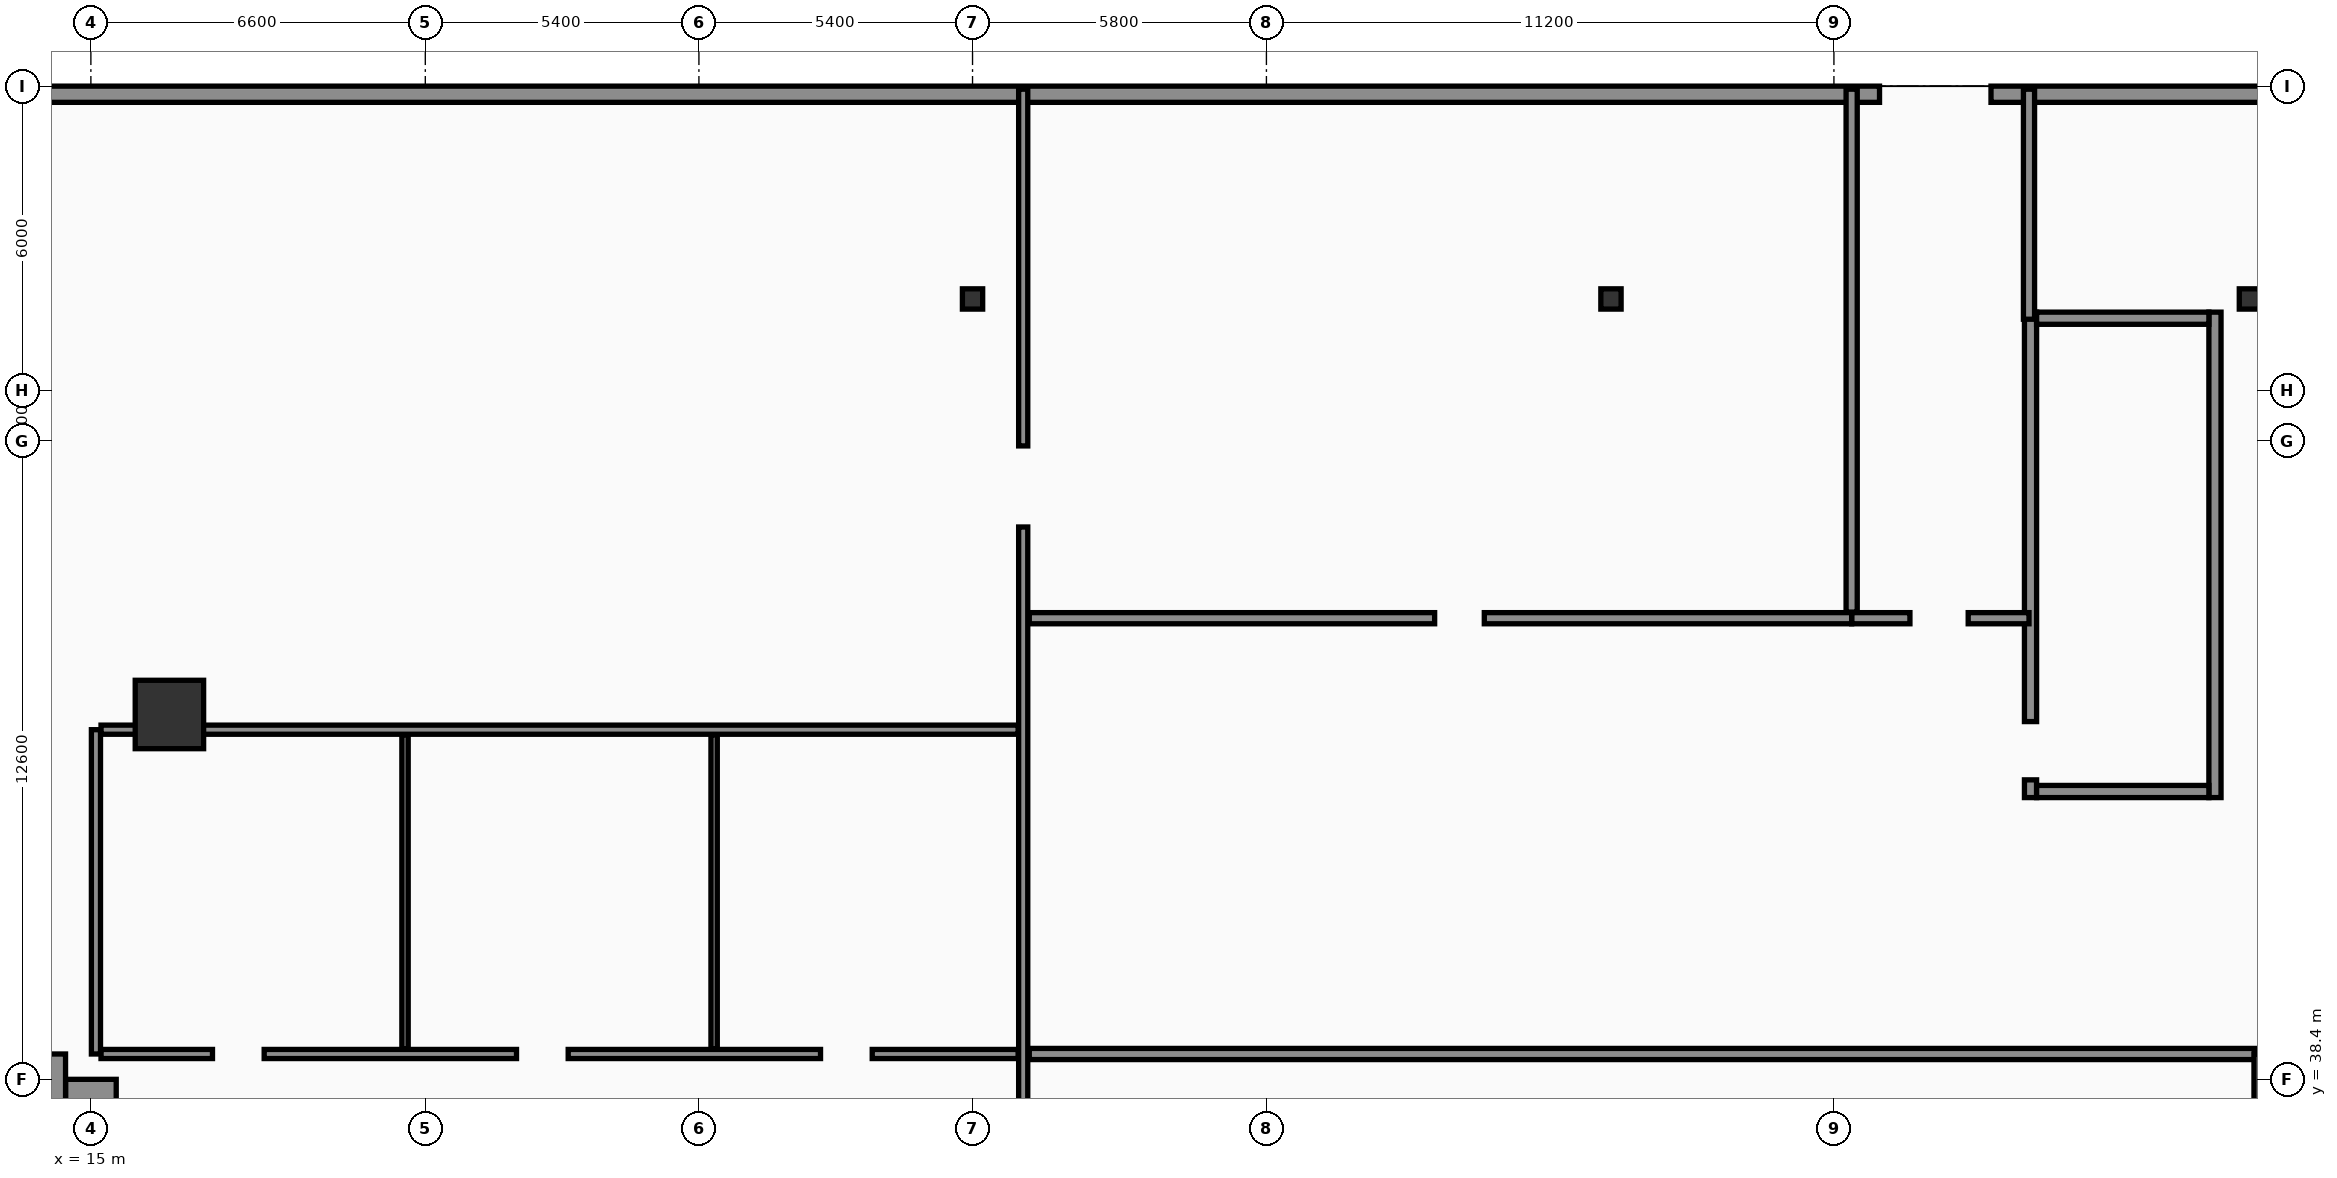
"""IFC4 building model, lengths in metres.
Left out: names, types, materials, properties, quantities, classifications, styles, units other than length and angle.
Written with IfcOpenShell. Run it as: python <this file> out.ifc"""

import sys

from ifc_helpers import new_model, si_unit, direction, frame, frame_2d, origin, origin_2d, place, context, subcontext, project, spatial, rectangle, i_section, extrude, element, fill, save


model = new_model("IFC4")
c1 = context("Model", 3, precision=1e-05, world=origin(), true_north=direction((0.0, 1.0)))
c2 = subcontext(c1, "Body", "Model", "MODEL_VIEW")
j1 = project(units=[si_unit("LENGTHUNIT", "METRE"), si_unit("PLANEANGLEUNIT", "RADIAN")], contexts=[c1])
p1 = place(None, origin())
s1 = spatial("IfcSite", under=j1, at=p1, CompositionType="ELEMENT")
p2 = place(p1, origin())
s2 = spatial("IfcBuilding", under=s1, at=p2, CompositionType="ELEMENT")
p3 = place(p2, origin())
s3 = spatial("IfcBuildingStorey", under=s2, at=p3, CompositionType="ELEMENT", Elevation=0.0)
p4 = place(p3, frame((15.0, 16.8, 0.0), z_axis=(0.0, 0.0, 1.0), x_axis=(0.0, 1.0, 0.0)))
e1 = element("IfcWall", 1, at=p4, inside=s3, PredefinedType="SHEAR", context=c2, shape_type="SweptSolid", body=[
    extrude(rectangle(XDim=21.6, YDim=1.0, at=frame_2d((10.8, 0.0))), origin(), (0.0, 0.0, 1.0), 5.68),
])
p5 = place(p4, frame((8.65, 0.0, 0.0)))
e2 = element("IfcOpeningElement", 2, at=p5, cuts=e1, PredefinedType="OPENING", context=c2, shape_type="SweptSolid", body=[
    extrude(rectangle(XDim=1.1, YDim=2.2, at=frame_2d((0.55, 1.1))), frame((0.0, 0.51, 0.0), z_axis=(0.0, -1.0, 0.0), x_axis=(1.0, 0.0, 0.0)), (0.0, 0.0, 1.0), 1.02),
])
p6 = place(p4, frame((1.25, 0.0, 0.0)))
e3 = element("IfcOpeningElement", 3, at=p6, cuts=e1, PredefinedType="OPENING", context=c2, shape_type="SweptSolid", body=[
    extrude(rectangle(XDim=1.1, YDim=2.2, at=frame_2d((0.55, 1.1))), frame((0.0, 0.51, 0.0), z_axis=(0.0, -1.0, 0.0), x_axis=(1.0, 0.0, 0.0)), (0.0, 0.0, 1.0), 1.02),
])
p7 = place(p4, frame((3.8, 0.0, 0.0)))
e4 = element("IfcOpeningElement", 4, at=p7, cuts=e1, PredefinedType="OPENING", context=c2, shape_type="SweptSolid", body=[
    extrude(rectangle(XDim=1.1, YDim=2.2, at=frame_2d((0.55, 1.1))), frame((0.0, 0.51, 0.0), z_axis=(0.0, -1.0, 0.0), x_axis=(1.0, 0.0, 0.0)), (0.0, 0.0, 1.0), 1.02),
])
p8 = place(p4, frame((6.35, 0.0, 0.0)))
e5 = element("IfcOpeningElement", 5, at=p8, cuts=e1, PredefinedType="OPENING", context=c2, shape_type="SweptSolid", body=[
    extrude(rectangle(XDim=1.1, YDim=2.2, at=frame_2d((0.55, 1.1))), frame((0.0, 0.51, 0.0), z_axis=(0.0, -1.0, 0.0), x_axis=(1.0, 0.0, 0.0)), (0.0, 0.0, 1.0), 1.02),
])
p9 = place(p4, frame((10.85, 0.0, 0.0)))
e6 = element("IfcOpeningElement", 6, at=p9, cuts=e1, PredefinedType="OPENING", context=c2, shape_type="SweptSolid", body=[
    extrude(rectangle(XDim=1.1, YDim=2.2, at=frame_2d((0.55, 1.1))), frame((0.0, 0.51, 0.0), z_axis=(0.0, -1.0, 0.0), x_axis=(1.0, 0.0, 0.0)), (0.0, 0.0, 1.0), 1.02),
])
p10 = place(p4, frame((13.5, 0.0, 0.0)))
e7 = element("IfcOpeningElement", 7, at=p10, cuts=e1, PredefinedType="OPENING", context=c2, shape_type="SweptSolid", body=[
    extrude(rectangle(XDim=1.1, YDim=2.2, at=frame_2d((0.55, 1.1))), frame((0.0, 0.51, 0.0), z_axis=(0.0, -1.0, 0.0), x_axis=(1.0, 0.0, 0.0)), (0.0, 0.0, 1.0), 1.02),
])
p11 = place(p4, frame((16.15, 0.0, 0.0)))
e8 = element("IfcOpeningElement", 8, at=p11, cuts=e1, PredefinedType="OPENING", context=c2, shape_type="SweptSolid", body=[
    extrude(rectangle(XDim=1.1, YDim=2.2, at=frame_2d((0.55, 1.1))), frame((0.0, 0.51, 0.0), z_axis=(0.0, -1.0, 0.0), x_axis=(1.0, 0.0, 0.0)), (0.0, 0.0, 1.0), 1.02),
])
p12 = place(p4, frame((18.9, 0.0, 0.0)))
e9 = element("IfcOpeningElement", 9, at=p12, cuts=e1, PredefinedType="OPENING", context=c2, shape_type="SweptSolid", body=[
    extrude(rectangle(XDim=1.1, YDim=2.2, at=frame_2d((0.55, 1.1))), frame((0.0, 0.51, 0.0), z_axis=(0.0, -1.0, 0.0), x_axis=(1.0, 0.0, 0.0)), (0.0, 0.0, 1.0), 1.02),
])
p13 = place(p3, frame((4.7, 38.4, 0.0), z_axis=(0.0, 0.0, 1.0), x_axis=(1.0, 0.0, 0.0)))
e10 = element("IfcWall", 10, at=p13, inside=s3, PredefinedType="SHEAR", context=c2, shape_type="SweptSolid", body=[
    extrude(rectangle(XDim=9.8, YDim=1.0, at=frame_2d((4.9, 0.0))), origin(), (0.0, 0.0, 1.0), 5.68),
])
p14 = place(p13, frame((5.6, 0.0, 0.0)))
e11 = element("IfcOpeningElement", 11, at=p14, cuts=e10, PredefinedType="OPENING", context=c2, shape_type="SweptSolid", body=[
    extrude(rectangle(XDim=1.1, YDim=2.2, at=frame_2d((0.55, 1.1))), frame((0.0, 0.51, 0.0), z_axis=(0.0, -1.0, 0.0), x_axis=(1.0, 0.0, 0.0)), (0.0, 0.0, 1.0), 1.02),
])
p15 = place(p3, frame((53.28, 43.96, 0.0), z_axis=(0.0, 0.0, 1.0), x_axis=(0.0, 1.0, 0.0)))
e12 = element("IfcWall", 12, at=p15, inside=s3, PredefinedType="SOLIDWALL", context=c2, shape_type="SweptSolid", body=[
    extrude(rectangle(XDim=9.58, YDim=0.24, at=frame_2d((4.79, 0.0))), origin(), (0.0, 0.0, 1.0), 5.68),
])
p16 = place(p15, frame((0.35, 0.0, 0.0)))
e13 = element("IfcOpeningElement", 13, at=p16, cuts=e12, PredefinedType="OPENING", context=c2, shape_type="SweptSolid", body=[
    extrude(rectangle(XDim=1.15, YDim=2.2, at=frame_2d((0.575, 1.1))), frame((0.0, 0.13, 0.0), z_axis=(0.0, -1.0, 0.0), x_axis=(1.0, 0.0, 0.0)), (0.0, 0.0, 1.0), 0.26),
])
p17 = place(p3, frame((56.92, 43.96, 0.0), z_axis=(0.0, 0.0, 1.0), x_axis=(0.0, 1.0, 0.0)))
e14 = element("IfcWall", 14, at=p17, inside=s3, PredefinedType="SOLIDWALL", context=c2, shape_type="SweptSolid", body=[
    extrude(rectangle(XDim=9.58, YDim=0.24, at=frame_2d((4.79, 0.0))), origin(), (0.0, 0.0, 1.0), 5.68),
])
for number, where, z_axis, x_axis in (
    (15, (53.4, 44.08, 0.0), (0.0, 0.0, 1.0), (1.0, 0.0, 0.0)),
    (16, (53.4, 53.42, 0.0), (0.0, 0.0, 1.0), (1.0, 0.0, 0.0)),
):
    element("IfcWall", number, at=place(p3, frame(where, z_axis=z_axis, x_axis=x_axis)), inside=s3, PredefinedType="SOLIDWALL", context=c2, shape_type="SweptSolid", body=[
        extrude(rectangle(XDim=3.4, YDim=0.24, at=frame_2d((1.7, 0.0))), origin(), (0.0, 0.0, 1.0), 5.68),
    ])
p18 = place(p3, frame((16.55, 45.6, 0.0), z_axis=(0.0, 0.0, 1.0), x_axis=(1.0, 0.0, 0.0)))
e17 = element("IfcColumn", 17, at=p18, inside=s3, PredefinedType="COLUMN", context=c2, shape_type="SweptSolid", body=[
    extrude(rectangle(XDim=1.35, YDim=1.35, at=origin_2d()), origin(), (0.0, 0.0, 1.0), 5.68),
])
for number, where, z_axis, x_axis in (
    (18, (32.4, 53.8, 0.0), (0.0, 0.0, 1.0), (1.0, 0.0, 0.0)),
    (19, (45.0, 53.8, 0.0), (0.0, 0.0, 1.0), (1.0, 0.0, 0.0)),
    (20, (57.6, 53.8, 0.0), (0.0, 0.0, 1.0), (1.0, 0.0, 0.0)),
):
    element("IfcColumn", number, at=place(p3, frame(where, z_axis=z_axis, x_axis=x_axis)), inside=s3, PredefinedType="PILASTER", context=c2, shape_type="SweptSolid", body=[
        extrude(i_section(OverallWidth=0.4, OverallDepth=0.4, WebThickness=0.013, FlangeThickness=0.021, FilletRadius=0.022, at=origin_2d()), origin(), (0.0, 0.0, 1.0), 5.68),
    ])
p19 = place(p3, frame((2.3, 57.84, 0.0), z_axis=(0.0, 0.0, 1.0), x_axis=(1.0, 0.0, 0.0)))
e21 = element("IfcWall", 21, at=p19, inside=s3, PredefinedType="SOLIDWALL", context=c2, shape_type="SweptSolid", body=[
    extrude(rectangle(XDim=79.4, YDim=0.32, at=frame_2d((39.7, 0.0))), origin(), (0.0, 0.0, 1.0), 5.68),
])
p20 = place(p19, frame((48.0, 0.0, 0.0)))
e22 = element("IfcOpeningElement", 22, at=p20, cuts=e21, PredefinedType="OPENING", context=c2, shape_type="SweptSolid", body=[
    extrude(rectangle(XDim=2.2, YDim=2.5, at=frame_2d((1.1, 1.25))), frame((0.0, 0.17, 0.0), z_axis=(0.0, -1.0, 0.0), x_axis=(1.0, 0.0, 0.0)), (0.0, 0.0, 1.0), 0.34),
])
p21 = place(p19, frame((57.0, 0.0, 0.0)))
e23 = element("IfcOpeningElement", 23, at=p21, cuts=e21, PredefinedType="OPENING", context=c2, shape_type="SweptSolid", body=[
    extrude(rectangle(XDim=4.2, YDim=2.8, at=frame_2d((2.1, 1.4))), frame((0.0, 0.17, 0.0), z_axis=(0.0, -1.0, 0.0), x_axis=(1.0, 0.0, 0.0)), (0.0, 0.0, 1.0), 0.34),
])
p22 = place(p19, frame((67.2, 0.0, 0.0)))
e24 = element("IfcOpeningElement", 24, at=p22, cuts=e21, PredefinedType="OPENING", context=c2, shape_type="SweptSolid", body=[
    extrude(rectangle(XDim=3.6, YDim=4.2, at=frame_2d((1.8, 2.1))), frame((0.0, 0.17, 0.0), z_axis=(0.0, -1.0, 0.0), x_axis=(1.0, 0.0, 0.0)), (0.0, 0.0, 1.0), 0.34),
])
p23 = place(p3, frame((49.75, 47.5, 0.0), z_axis=(0.0, 0.0, 1.0), x_axis=(1.0, 0.0, 0.0)))
e25 = element("IfcWall", 25, at=p23, inside=s3, PredefinedType="SOLIDWALL", context=c2, shape_type="SweptSolid", body=[
    extrude(rectangle(XDim=3.5, YDim=0.22, at=frame_2d((1.75, 0.0))), origin(), (0.0, 0.0, 1.0), 5.68),
])
p24 = place(p23, frame((1.15, 0.0, 0.0)))
e26 = element("IfcOpeningElement", 26, at=p24, cuts=e25, PredefinedType="OPENING", context=c2, shape_type="SweptSolid", body=[
    extrude(rectangle(XDim=1.15, YDim=2.2, at=frame_2d((0.575, 1.1))), frame((0.0, 0.12, 0.0), z_axis=(0.0, -1.0, 0.0), x_axis=(1.0, 0.0, 0.0)), (0.0, 0.0, 1.0), 0.24),
])
p25 = place(p3, frame((49.75, 47.62, 0.0), z_axis=(0.0, 0.0, 1.0), x_axis=(0.0, 1.0, 0.0)))
e27 = element("IfcWall", 27, at=p25, inside=s3, PredefinedType="SOLIDWALL", context=c2, shape_type="SweptSolid", body=[
    extrude(rectangle(XDim=10.32, YDim=0.22, at=frame_2d((5.16, 0.0))), origin(), (0.0, 0.0, 1.0), 4.88),
])
p26 = place(p3, frame((53.25, 53.4, 0.0), z_axis=(0.0, 0.0, 1.0), x_axis=(0.0, 1.0, 0.0)))
e28 = element("IfcWall", 28, at=p26, inside=s3, PredefinedType="SOLIDWALL", context=c2, shape_type="SweptSolid", body=[
    extrude(rectangle(XDim=4.54, YDim=0.22, at=frame_2d((2.27, 0.0))), origin(), (0.0, 0.0, 1.0), 4.88),
])
p27 = place(p3, frame((15.2, 38.9, 0.0), z_axis=(0.0, 0.0, 1.0), x_axis=(1.0, 0.0, 0.0)))
e29 = element("IfcWall", 29, at=p27, inside=s3, PredefinedType="PARTITIONING", context=c2, shape_type="SweptSolid", body=[
    extrude(rectangle(XDim=18.1, YDim=0.18, at=frame_2d((9.05, 0.0))), origin(), (0.0, 0.0, 1.0), 4.88),
])
p28 = place(p27, frame((2.2, 0.0, 0.0)))
e30 = element("IfcOpeningElement", 30, at=p28, cuts=e29, PredefinedType="OPENING", context=c2, shape_type="SweptSolid", body=[
    extrude(rectangle(XDim=1.02, YDim=2.2, at=frame_2d((0.51, 1.1))), frame((0.0, 0.1, 0.0), z_axis=(0.0, -1.0, 0.0), x_axis=(1.0, 0.0, 0.0)), (0.0, 0.0, 1.0), 0.2),
])
p29 = place(p27, frame((8.2, 0.0, 0.0)))
e31 = element("IfcOpeningElement", 31, at=p29, cuts=e29, PredefinedType="OPENING", context=c2, shape_type="SweptSolid", body=[
    extrude(rectangle(XDim=1.02, YDim=2.2, at=frame_2d((0.51, 1.1))), frame((0.0, 0.1, 0.0), z_axis=(0.0, -1.0, 0.0), x_axis=(1.0, 0.0, 0.0)), (0.0, 0.0, 1.0), 0.2),
])
p30 = place(p27, frame((14.2, 0.0, 0.0)))
e32 = element("IfcOpeningElement", 32, at=p30, cuts=e29, PredefinedType="OPENING", context=c2, shape_type="SweptSolid", body=[
    extrude(rectangle(XDim=1.02, YDim=2.2, at=frame_2d((0.51, 1.1))), frame((0.0, 0.1, 0.0), z_axis=(0.0, -1.0, 0.0), x_axis=(1.0, 0.0, 0.0)), (0.0, 0.0, 1.0), 0.2),
])
p31 = place(p3, frame((15.2, 45.3, 0.0), z_axis=(0.0, 0.0, 1.0), x_axis=(1.0, 0.0, 0.0)))
e33 = element("IfcWall", 33, at=p31, inside=s3, PredefinedType="PARTITIONING", context=c2, shape_type="SweptSolid", body=[
    extrude(rectangle(XDim=18.1, YDim=0.18, at=frame_2d((9.05, 0.0))), origin(), (0.0, 0.0, 1.0), 4.88),
])
p32 = place(p3, frame((15.1, 38.9, 0.0), z_axis=(0.0, 0.0, 1.0), x_axis=(0.0, 1.0, 0.0)))
e34 = element("IfcWall", 34, at=p32, inside=s3, PredefinedType="PARTITIONING", context=c2, shape_type="SweptSolid", body=[
    extrude(rectangle(XDim=6.4, YDim=0.18, at=frame_2d((3.2, 0.0))), origin(), (0.0, 0.0, 1.0), 4.88),
])
p33 = place(p3, frame((21.2, 39.0, 0.0), z_axis=(0.0, 0.0, 1.0), x_axis=(0.0, 1.0, 0.0)))
e35 = element("IfcWall", 35, at=p33, inside=s3, PredefinedType="PARTITIONING", context=c2, shape_type="SweptSolid", body=[
    extrude(rectangle(XDim=6.2, YDim=0.125, at=frame_2d((3.1, 0.0))), origin(), (0.0, 0.0, 1.0), 4.88),
])
p34 = place(p3, frame((27.3, 39.0, 0.0), z_axis=(0.0, 0.0, 1.0), x_axis=(0.0, 1.0, 0.0)))
e36 = element("IfcWall", 36, at=p34, inside=s3, PredefinedType="PARTITIONING", context=c2, shape_type="SweptSolid", body=[
    extrude(rectangle(XDim=6.2, YDim=0.125, at=frame_2d((3.1, 0.0))), origin(), (0.0, 0.0, 1.0), 5.68),
])
p35 = place(p3, frame((33.4, 0.3, 0.0), z_axis=(0.0, 0.0, 1.0), x_axis=(0.0, 1.0, 0.0)))
e37 = element("IfcWall", 37, at=p35, inside=s3, PredefinedType="PARTITIONING", context=c2, shape_type="SweptSolid", body=[
    extrude(rectangle(XDim=57.64, YDim=0.18, at=frame_2d((28.82, 0.0))), origin(), (0.0, 0.0, 1.0), 4.88),
])
p36 = place(p35, frame((6.0, 0.0, 0.0)))
e38 = element("IfcOpeningElement", 38, at=p36, cuts=e37, PredefinedType="OPENING", context=c2, shape_type="SweptSolid", body=[
    extrude(rectangle(XDim=1.5, YDim=2.22, at=frame_2d((0.75, 1.11))), frame((0.0, 0.1, 0.0), z_axis=(0.0, -1.0, 0.0), x_axis=(1.0, 0.0, 0.0)), (0.0, 0.0, 1.0), 0.2),
])
p37 = place(p35, frame((20.0, 0.0, 0.0)))
e39 = element("IfcOpeningElement", 39, at=p37, cuts=e37, PredefinedType="OPENING", context=c2, shape_type="SweptSolid", body=[
    extrude(rectangle(XDim=1.8, YDim=2.4, at=frame_2d((0.9, 1.2))), frame((0.0, 0.1, 0.0), z_axis=(0.0, -1.0, 0.0), x_axis=(1.0, 0.0, 0.0)), (0.0, 0.0, 1.0), 0.2),
])
p38 = place(p35, frame((49.0, 0.0, 0.0)))
e40 = element("IfcOpeningElement", 40, at=p38, cuts=e37, PredefinedType="OPENING", context=c2, shape_type="SweptSolid", body=[
    extrude(rectangle(XDim=1.6, YDim=2.35, at=frame_2d((0.8, 1.175))), frame((0.0, 0.1, 0.0), z_axis=(0.0, -1.0, 0.0), x_axis=(1.0, 0.0, 0.0)), (0.0, 0.0, 1.0), 0.2),
])
p39 = place(p3, frame((33.52, 38.9, 0.0), z_axis=(0.0, 0.0, 1.0), x_axis=(1.0, 0.0, 0.0)))
e41 = element("IfcWall", 41, at=p39, inside=s3, PredefinedType="SOLIDWALL", context=c2, shape_type="SweptSolid", body=[
    extrude(rectangle(XDim=24.18, YDim=0.22, at=frame_2d((12.09, 0.0))), origin(), (0.0, 0.0, 1.0), 4.88),
])
p40 = place(p3, frame((57.8, 0.06, 0.0), z_axis=(0.0, 0.0, 1.0), x_axis=(0.0, 1.0, 0.0)))
e42 = element("IfcWall", 42, at=p40, inside=s3, PredefinedType="SOLIDWALL", context=c2, shape_type="SweptSolid", body=[
    extrude(rectangle(XDim=38.84, YDim=0.22, at=frame_2d((19.42, 0.0))), origin(), (0.0, 0.0, 1.0), 4.18),
])
p41 = place(p3, frame((33.52, 47.5, 0.0), z_axis=(0.0, 0.0, 1.0), x_axis=(1.0, 0.0, 0.0)))
e43 = element("IfcWall", 43, at=p41, inside=s3, PredefinedType="SOLIDWALL", context=c2, shape_type="SweptSolid", body=[
    extrude(rectangle(XDim=16.23, YDim=0.22, at=frame_2d((8.115, 0.0))), origin(), (0.0, 0.0, 1.0), 4.88),
])
p42 = place(p41, frame((8.0, 0.0, 0.0)))
e44 = element("IfcOpeningElement", 44, at=p42, cuts=e43, PredefinedType="OPENING", context=c2, shape_type="SweptSolid", body=[
    extrude(rectangle(XDim=0.98, YDim=2.15, at=frame_2d((0.49, 1.075))), frame((0.0, 0.12, 0.0), z_axis=(0.0, -1.0, 0.0), x_axis=(1.0, 0.0, 0.0)), (0.0, 0.0, 1.0), 0.24),
])
p43 = place(p20, origin())
e45 = element("IfcDoor", 45, at=p43, inside=s3, OperationType="DOUBLE_DOOR_SINGLE_SWING", PredefinedType="DOOR", context=c2, shape_type="SweptSolid", body=[
    extrude(rectangle(XDim=2.2, YDim=2.5, at=frame_2d((1.1, 1.25))), frame((0.0, 0.025, 0.0), z_axis=(0.0, -1.0, 0.0), x_axis=(1.0, 0.0, 0.0)), (0.0, 0.0, 1.0), 0.05),
])
fill(e22, e45)
p44 = place(p24, origin())
e46 = element("IfcDoor", 46, at=p44, inside=s3, OperationType="SINGLE_SWING_LEFT", PredefinedType="DOOR", context=c2, shape_type="SweptSolid", body=[
    extrude(rectangle(XDim=1.15, YDim=2.2, at=frame_2d((0.575, 1.1))), frame((0.0, 0.025, 0.0), z_axis=(0.0, -1.0, 0.0), x_axis=(1.0, 0.0, 0.0)), (0.0, 0.0, 1.0), 0.05),
])
fill(e26, e46)
p45 = place(p28, origin())
e47 = element("IfcDoor", 47, at=p45, inside=s3, OperationType="SINGLE_SWING_LEFT", PredefinedType="DOOR", context=c2, shape_type="SweptSolid", body=[
    extrude(rectangle(XDim=1.02, YDim=2.2, at=frame_2d((0.51, 1.1))), frame((0.0, 0.025, 0.0), z_axis=(0.0, -1.0, 0.0), x_axis=(1.0, 0.0, 0.0)), (0.0, 0.0, 1.0), 0.05),
])
fill(e30, e47)
p46 = place(p29, origin())
e48 = element("IfcDoor", 48, at=p46, inside=s3, OperationType="SINGLE_SWING_RIGHT", PredefinedType="DOOR", context=c2, shape_type="SweptSolid", body=[
    extrude(rectangle(XDim=1.02, YDim=2.2, at=frame_2d((0.51, 1.1))), frame((0.0, 0.025, 0.0), z_axis=(0.0, -1.0, 0.0), x_axis=(1.0, 0.0, 0.0)), (0.0, 0.0, 1.0), 0.05),
])
fill(e31, e48)
p47 = place(p30, origin())
e49 = element("IfcDoor", 49, at=p47, inside=s3, OperationType="SINGLE_SWING_LEFT", PredefinedType="DOOR", context=c2, shape_type="SweptSolid", body=[
    extrude(rectangle(XDim=1.02, YDim=2.2, at=frame_2d((0.51, 1.1))), frame((0.0, 0.025, 0.0), z_axis=(0.0, -1.0, 0.0), x_axis=(1.0, 0.0, 0.0)), (0.0, 0.0, 1.0), 0.05),
])
fill(e32, e49)
p48 = place(p38, origin())
e50 = element("IfcDoor", 50, at=p48, inside=s3, OperationType="SINGLE_SWING_LEFT", PredefinedType="DOOR", context=c2, shape_type="SweptSolid", body=[
    extrude(rectangle(XDim=1.6, YDim=2.35, at=frame_2d((0.8, 1.175))), frame((0.0, 0.025, 0.0), z_axis=(0.0, -1.0, 0.0), x_axis=(1.0, 0.0, 0.0)), (0.0, 0.0, 1.0), 0.05),
])
fill(e40, e50)
p49 = place(p42, origin())
e51 = element("IfcDoor", 51, at=p49, inside=s3, OperationType="SINGLE_SWING_RIGHT", PredefinedType="DOOR", context=c2, shape_type="SweptSolid", body=[
    extrude(rectangle(XDim=0.98, YDim=2.15, at=frame_2d((0.49, 1.075))), frame((0.0, 0.025, 0.0), z_axis=(0.0, -1.0, 0.0), x_axis=(1.0, 0.0, 0.0)), (0.0, 0.0, 1.0), 0.05),
])
fill(e44, e51)
p50 = place(p16, origin())
e52 = element("IfcDoor", 52, at=p50, inside=s3, OperationType="SINGLE_SWING_LEFT", PredefinedType="DOOR", context=c2, shape_type="SweptSolid", body=[
    extrude(rectangle(XDim=1.15, YDim=2.2, at=frame_2d((0.575, 1.1))), frame((0.0, 0.025, 0.0), z_axis=(0.0, -1.0, 0.0), x_axis=(1.0, 0.0, 0.0)), (0.0, 0.0, 1.0), 0.05),
])
fill(e13, e52)
save(model, sys.argv[1])
